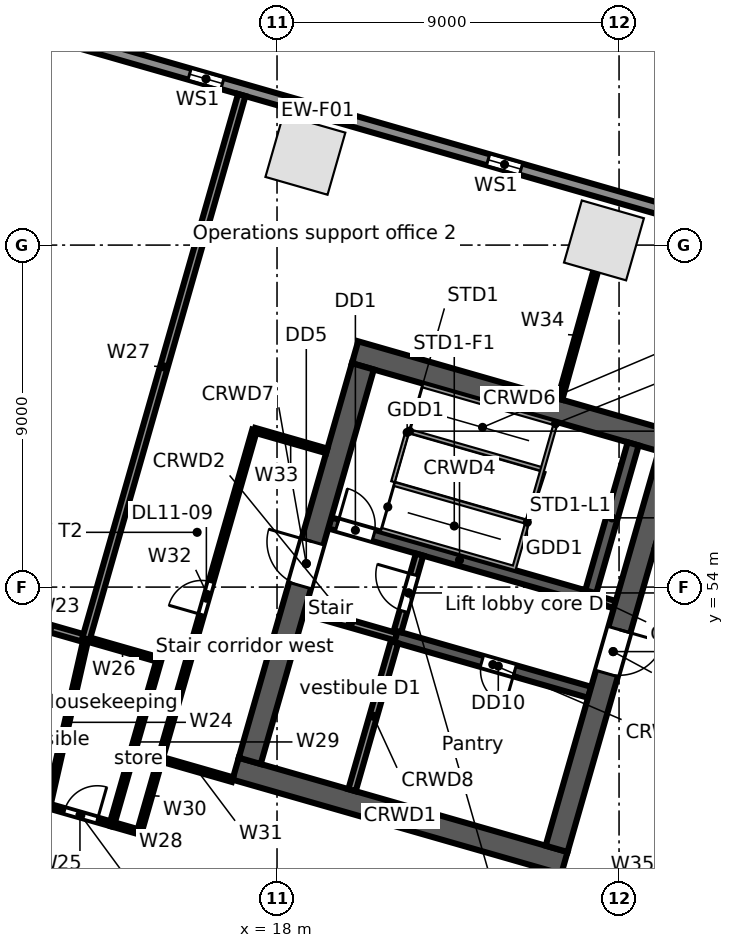
"""IFC4 building model, lengths in metres.
Left out: names, types, materials, properties, quantities, classifications, styles, units other than length and angle.
Written with IfcOpenShell. Run it as: python <this file> out.ifc"""

import sys

from ifc_helpers import new_model, si_unit, direction, frame, frame_2d, origin, origin_2d, place, context, subcontext, project, spatial, rectangle, extrude, element, fill, save


model = new_model("IFC4")
c1 = context("Model", 3, precision=1e-05, world=origin(), true_north=direction((0.0, 1.0)))
c2 = subcontext(c1, "Body", "Model", "MODEL_VIEW")
j1 = project(units=[si_unit("LENGTHUNIT", "METRE"), si_unit("PLANEANGLEUNIT", "RADIAN")], contexts=[c1])
p1 = place(None, origin())
s1 = spatial("IfcSite", under=j1, at=p1, CompositionType="ELEMENT")
p2 = place(p1, origin())
s2 = spatial("IfcBuilding", under=s1, at=p2, CompositionType="ELEMENT")
p3 = place(p2, frame((0.0, 0.0, 56.5)))
s3 = spatial("IfcBuildingStorey", under=s2, at=p3, CompositionType="ELEMENT", Elevation=56.5)
for number, where, z_axis, x_axis in (
    (1, (26.603, 63.124, 0.0), (0.0, 0.0, 1.0), (-0.961, 0.276, 0.0)),
    (2, (18.746, 65.376, 0.0), (0.0, 0.0, 1.0), (-0.961, 0.276, 0.0)),
):
    element("IfcColumn", number, at=place(p3, frame(where, z_axis=z_axis, x_axis=x_axis)), inside=s3, PredefinedType="COLUMN", context=c2, shape_type="SweptSolid", body=[
        extrude(rectangle(XDim=1.7, YDim=1.7, at=origin_2d()), origin(), (0.0, 0.0, 1.0), 5.0),
    ])
p4 = place(p3, frame((3.335, 71.044, 0.0), z_axis=(0.0, 0.0, 1.0), x_axis=(0.961260130989, -0.275642813387, 0.0)))
e3 = element("IfcWall", 3, at=p4, inside=s3, PredefinedType="STANDARD", context=c2, shape_type="SweptSolid", body=[
    extrude(rectangle(XDim=32.741, YDim=0.3, at=frame_2d((16.371, 0.0))), origin(), (0.0, 0.0, 1.0), 4.68),
])
p5 = place(p4, frame((29.207, 0.0, 0.6)))
e4 = element("IfcOpeningElement", 4, at=p5, cuts=e3, PredefinedType="OPENING", context=c2, shape_type="SweptSolid", body=[
    extrude(rectangle(XDim=0.9, YDim=3.2, at=frame_2d((0.45, 1.6))), frame((0.0, 0.16, 0.0), z_axis=(0.0, -1.0, 0.0), x_axis=(1.0, 0.0, 0.0)), (0.0, 0.0, 1.0), 0.32),
])
p6 = place(p4, frame((21.034, 0.0, 0.6)))
e5 = element("IfcOpeningElement", 5, at=p6, cuts=e3, PredefinedType="OPENING", context=c2, shape_type="SweptSolid", body=[
    extrude(rectangle(XDim=0.9, YDim=3.2, at=frame_2d((0.45, 1.6))), frame((0.0, 0.16, 0.0), z_axis=(0.0, -1.0, 0.0), x_axis=(1.0, 0.0, 0.0)), (0.0, 0.0, 1.0), 0.32),
])
p7 = place(p4, frame((12.861, 0.0, 0.6)))
e6 = element("IfcOpeningElement", 6, at=p7, cuts=e3, PredefinedType="OPENING", context=c2, shape_type="SweptSolid", body=[
    extrude(rectangle(XDim=0.9, YDim=3.2, at=frame_2d((0.45, 1.6))), frame((0.0, 0.16, 0.0), z_axis=(0.0, -1.0, 0.0), x_axis=(1.0, 0.0, 0.0)), (0.0, 0.0, 1.0), 0.32),
])
p8 = place(p4, frame((4.688, 0.0, 0.6)))
e7 = element("IfcOpeningElement", 7, at=p8, cuts=e3, PredefinedType="OPENING", context=c2, shape_type="SweptSolid", body=[
    extrude(rectangle(XDim=0.9, YDim=3.2, at=frame_2d((0.45, 1.6))), frame((0.0, 0.16, 0.0), z_axis=(0.0, -1.0, 0.0), x_axis=(1.0, 0.0, 0.0)), (0.0, 0.0, 1.0), 0.32),
])
p9 = place(p3, frame((25.398, 40.717, 0.0), z_axis=(0.0, 0.0, 1.0), x_axis=(-0.961262423262, 0.275634819324, 0.0)))
e8 = element("IfcWall", 8, at=p9, inside=s3, PredefinedType="STANDARD", context=c2, shape_type="SweptSolid", body=[
    extrude(rectangle(XDim=26.359, YDim=0.3, at=frame_2d((13.179, 0.0))), origin(), (0.0, 0.0, 1.0), 4.68),
])
p10 = place(p9, frame((22.664, 0.0, 0.6)))
e9 = element("IfcOpeningElement", 9, at=p10, cuts=e8, PredefinedType="OPENING", context=c2, shape_type="SweptSolid", body=[
    extrude(rectangle(XDim=0.9, YDim=3.2, at=frame_2d((0.45, 1.6))), frame((0.0, 0.16, 0.0), z_axis=(0.0, -1.0, 0.0), x_axis=(1.0, 0.0, 0.0)), (0.0, 0.0, 1.0), 0.32),
])
p11 = place(p9, frame((13.844, 0.0, 0.6)))
e10 = element("IfcOpeningElement", 10, at=p11, cuts=e8, PredefinedType="OPENING", context=c2, shape_type="SweptSolid", body=[
    extrude(rectangle(XDim=0.9, YDim=3.2, at=frame_2d((0.45, 1.6))), frame((0.0, 0.16, 0.0), z_axis=(0.0, -1.0, 0.0), x_axis=(1.0, 0.0, 0.0)), (0.0, 0.0, 1.0), 0.32),
])
p12 = place(p9, frame((5.023, 0.0, 0.6)))
e11 = element("IfcOpeningElement", 11, at=p12, cuts=e8, PredefinedType="OPENING", context=c2, shape_type="SweptSolid", body=[
    extrude(rectangle(XDim=0.9, YDim=3.2, at=frame_2d((0.45, 1.6))), frame((0.0, 0.16, 0.0), z_axis=(0.0, -1.0, 0.0), x_axis=(1.0, 0.0, 0.0)), (0.0, 0.0, 1.0), 0.32),
])
p13 = place(p3, frame((16.911, 49.221, 0.0), z_axis=(0.0, 0.0, 1.0), x_axis=(0.96126248289, -0.275634611374, 0.0)))
e12 = element("IfcWall", 12, at=p13, inside=s3, PredefinedType="SOLIDWALL", context=c2, shape_type="SweptSolid", body=[
    extrude(rectangle(XDim=9.0, YDim=0.6, at=frame_2d((4.5, 0.0))), origin(), (0.0, 0.0, 1.0), 4.68),
])
p14 = place(p3, frame((18.728, 53.382, 0.0), z_axis=(0.0, 0.0, 1.0), x_axis=(0.961247070632, -0.275688355216, 0.0)))
e13 = element("IfcWall", 13, at=p14, inside=s3, PredefinedType="SOLIDWALL", context=c2, shape_type="SweptSolid", body=[
    extrude(rectangle(XDim=2.5, YDim=0.2, at=frame_2d((1.25, 0.0))), origin(), (0.0, 0.0, 1.0), 4.68),
])
p15 = place(p3, frame((21.131, 52.692, 0.0), z_axis=(0.0, 0.0, 1.0), x_axis=(0.961271492568, -0.275603188616, 0.0)))
e14 = element("IfcWall", 14, at=p15, inside=s3, PredefinedType="SOLIDWALL", context=c2, shape_type="SweptSolid", body=[
    extrude(rectangle(XDim=5.3, YDim=0.3, at=frame_2d((2.65, 0.0))), origin(), (0.0, 0.0, 1.0), 4.68),
])
p16 = place(p15, frame((2.35, 0.0, 0.0)))
e15 = element("IfcOpeningElement", 15, at=p16, cuts=e14, PredefinedType="OPENING", context=c2, shape_type="SweptSolid", body=[
    extrude(rectangle(XDim=0.9, YDim=2.1, at=frame_2d((0.45, 1.05))), frame((0.0, 0.16, 0.0), z_axis=(0.0, -1.0, 0.0), x_axis=(1.0, 0.0, 0.0)), (0.0, 0.0, 1.0), 0.32),
])
p17 = place(p3, frame((19.389, 55.689, 0.0), z_axis=(0.0, 0.0, 1.0), x_axis=(0.961261397636, -0.275638396117, 0.0)))
e16 = element("IfcWall", 16, at=p17, inside=s3, PredefinedType="SOLIDWALL", context=c2, shape_type="SweptSolid", body=[
    extrude(rectangle(XDim=7.1, YDim=0.3, at=frame_2d((3.55, 0.0))), origin(), (0.0, 0.0, 1.0), 4.68),
])
p18 = place(p17, frame((0.2, 0.0, 0.0)))
e17 = element("IfcOpeningElement", 17, at=p18, cuts=e16, PredefinedType="OPENING", context=c2, shape_type="SweptSolid", body=[
    extrude(rectangle(XDim=1.0, YDim=2.1, at=frame_2d((0.5, 1.05))), frame((0.0, 0.16, 0.0), z_axis=(0.0, -1.0, 0.0), x_axis=(1.0, 0.0, 0.0)), (0.0, 0.0, 1.0), 0.32),
])
p19 = place(p3, frame((26.214, 53.732, 0.0), z_axis=(0.0, 0.0, 1.0), x_axis=(0.96122076476, -0.27578005982, 0.0)))
e18 = element("IfcWall", 18, at=p19, inside=s3, PredefinedType="SOLIDWALL", context=c2, shape_type="SweptSolid", body=[
    extrude(rectangle(XDim=0.7, YDim=0.2, at=frame_2d((0.35, 0.0))), origin(), (0.0, 0.0, 1.0), 4.68),
])
p20 = place(p3, frame((20.053, 60.18, 0.0), z_axis=(0.0, 0.0, 1.0), x_axis=(0.96126248289, -0.275634611374, 0.0)))
e19 = element("IfcWall", 19, at=p20, inside=s3, PredefinedType="SOLIDWALL", context=c2, shape_type="SweptSolid", body=[
    extrude(rectangle(XDim=9.0, YDim=0.6, at=frame_2d((4.5, 0.0))), origin(), (0.0, 0.0, 1.0), 4.68),
])
p21 = place(p3, frame((17.282, 49.427, 0.0), z_axis=(0.0, 0.0, 1.0), x_axis=(0.275631631629, 0.961263337304, 0.0)))
e20 = element("IfcWall", 20, at=p21, inside=s3, PredefinedType="SOLIDWALL", context=c2, shape_type="SweptSolid", body=[
    extrude(rectangle(XDim=10.8, YDim=0.6, at=frame_2d((5.4, 0.0))), origin(), (0.0, 0.0, 1.0), 4.68),
])
p22 = place(p21, frame((4.8, 0.0, 0.0)))
e21 = element("IfcOpeningElement", 21, at=p22, cuts=e20, PredefinedType="OPENING", context=c2, shape_type="SweptSolid", body=[
    extrude(rectangle(XDim=1.2, YDim=2.1, at=frame_2d((0.6, 1.05))), frame((0.0, 0.31, 0.0), z_axis=(0.0, -1.0, 0.0), x_axis=(1.0, 0.0, 0.0)), (0.0, 0.0, 1.0), 0.62),
])
p23 = place(p3, frame((19.973, 48.655, 0.0), z_axis=(0.0, 0.0, 1.0), x_axis=(0.275668441653, 0.961252781674, 0.0)))
e22 = element("IfcWall", 22, at=p23, inside=s3, PredefinedType="SOLIDWALL", context=c2, shape_type="SweptSolid", body=[
    extrude(rectangle(XDim=4.05, YDim=0.2, at=frame_2d((2.025, 0.0))), origin(), (0.0, 0.0, 1.0), 4.68),
])
p24 = place(p3, frame((21.172, 52.837, 0.0), z_axis=(0.0, 0.0, 1.0), x_axis=(0.275657676022, 0.961255868981, 0.0)))
e23 = element("IfcWall", 23, at=p24, inside=s3, PredefinedType="PARTITIONING", context=c2, shape_type="SweptSolid", body=[
    extrude(rectangle(XDim=2.1, YDim=0.2, at=frame_2d((1.05, 0.0))), origin(), (0.0, 0.0, 1.0), 4.68),
])
p25 = place(p24, frame((0.55, 0.0, 0.0)))
e24 = element("IfcOpeningElement", 24, at=p25, cuts=e23, PredefinedType="OPENING", context=c2, shape_type="SweptSolid", body=[
    extrude(rectangle(XDim=1.0, YDim=2.1, at=frame_2d((0.5, 1.05))), frame((0.0, 0.11, 0.0), z_axis=(0.0, -1.0, 0.0), x_axis=(1.0, 0.0, 0.0)), (0.0, 0.0, 1.0), 0.22),
])
p26 = place(p3, frame((26.256, 53.876, 0.0), z_axis=(0.0, 0.0, 1.0), x_axis=(0.275612739511, 0.961268754209, 0.0)))
e25 = element("IfcWall", 25, at=p26, inside=s3, PredefinedType="SOLIDWALL", context=c2, shape_type="SweptSolid", body=[
    extrude(rectangle(XDim=4.05, YDim=0.3, at=frame_2d((2.025, 0.0))), origin(), (0.0, 0.0, 1.0), 4.68),
])
p27 = place(p3, frame((25.356, 47.112, 0.0), z_axis=(0.0, 0.0, 1.0), x_axis=(0.275631631629, 0.961263337304, 0.0)))
e26 = element("IfcWall", 26, at=p27, inside=s3, PredefinedType="SOLIDWALL", context=c2, shape_type="SweptSolid", body=[
    extrude(rectangle(XDim=10.8, YDim=0.6, at=frame_2d((5.4, 0.0))), origin(), (0.0, 0.0, 1.0), 4.68),
])
p28 = place(p27, frame((4.8, 0.0, 0.0)))
e27 = element("IfcOpeningElement", 27, at=p28, cuts=e26, PredefinedType="OPENING", context=c2, shape_type="SweptSolid", body=[
    extrude(rectangle(XDim=1.2, YDim=2.1, at=frame_2d((0.6, 1.05))), frame((0.0, 0.31, 0.0), z_axis=(0.0, -1.0, 0.0), x_axis=(1.0, 0.0, 0.0)), (0.0, 0.0, 1.0), 0.62),
])
p29 = place(p3, frame((11.051, 53.19, 0.0), z_axis=(0.0, 0.0, 1.0), x_axis=(0.961316434736, -0.275446387355, 0.0)))
e28 = element("IfcWall", 28, at=p29, inside=s3, PredefinedType="PARTITIONING", context=c2, shape_type="SweptSolid", body=[
    extrude(rectangle(XDim=2.0, YDim=0.2, at=frame_2d((1.0, 0.0))), origin(), (0.0, 0.0, 1.0), 4.68),
])
p30 = place(p3, frame((11.973, 48.244, 0.0), z_axis=(0.0, 0.0, 1.0), x_axis=(0.222117362571, 0.975019936845, 0.0)))
e29 = element("IfcWall", 29, at=p30, inside=s3, PredefinedType="PARTITIONING", context=c2, shape_type="SweptSolid", body=[
    extrude(rectangle(XDim=4.508, YDim=0.125, at=frame_2d((2.254, 0.0))), origin(), (0.0, 0.0, 1.0), 4.68),
])
p31 = place(p3, frame((11.973, 48.244, 0.0), z_axis=(0.0, 0.0, 1.0), x_axis=(0.96136592135, -0.275273618907, 0.0)))
e30 = element("IfcWall", 30, at=p31, inside=s3, PredefinedType="PARTITIONING", context=c2, shape_type="SweptSolid", body=[
    extrude(rectangle(XDim=1.751, YDim=0.125, at=frame_2d((0.875, 0.0))), origin(), (0.0, 0.0, 1.0), 4.68),
])
p32 = place(p31, frame((0.45, 0.0, 0.0)))
e31 = element("IfcOpeningElement", 31, at=p32, cuts=e30, PredefinedType="OPENING", context=c2, shape_type="SweptSolid", body=[
    extrude(rectangle(XDim=0.9, YDim=2.1, at=frame_2d((0.45, 1.05))), frame((0.0, 0.073, 0.0), z_axis=(0.0, -1.0, 0.0), x_axis=(1.0, 0.0, 0.0)), (0.0, 0.0, 1.0), 0.145),
])
p33 = place(p3, frame((12.974, 52.639, 0.0), z_axis=(0.0, 0.0, 1.0), x_axis=(0.961270097305, -0.275608055084, 0.0)))
e32 = element("IfcWall", 32, at=p33, inside=s3, PredefinedType="PARTITIONING", context=c2, shape_type="SweptSolid", body=[
    extrude(rectangle(XDim=1.999, YDim=0.125, at=frame_2d((1.0, 0.0))), origin(), (0.0, 0.0, 1.0), 4.68),
])
p34 = place(p3, frame((12.974, 52.639, 0.0), z_axis=(0.0, 0.0, 1.0), x_axis=(0.275299463768, 0.961358520662, 0.0)))
e33 = element("IfcWall", 33, at=p34, inside=s3, PredefinedType="PARTITIONING", context=c2, shape_type="SweptSolid", body=[
    extrude(rectangle(XDim=14.885, YDim=0.2, at=frame_2d((7.443, 0.0))), origin(), (0.0, 0.0, 1.0), 3.742),
])
p35 = place(p3, frame((13.656, 47.762, 0.0), z_axis=(0.0, 0.0, 1.0), x_axis=(0.961154610169, -0.276010534854, 0.0)))
e34 = element("IfcWall", 34, at=p35, inside=s3, PredefinedType="PARTITIONING", context=c2, shape_type="SweptSolid", body=[
    extrude(rectangle(XDim=0.75, YDim=0.125, at=frame_2d((0.375, 0.0))), origin(), (0.0, 0.0, 1.0), 4.68),
])
p36 = place(p3, frame((13.656, 47.762, 0.0), z_axis=(0.0, 0.0, 1.0), x_axis=(0.275545040649, 0.96128816209, 0.0)))
e35 = element("IfcWall", 35, at=p36, inside=s3, PredefinedType="PARTITIONING", context=c2, shape_type="SweptSolid", body=[
    extrude(rectangle(XDim=4.5, YDim=0.125, at=frame_2d((2.25, 0.0))), origin(), (0.0, 0.0, 1.0), 4.68),
])
p37 = place(p3, frame((14.377, 47.555, 0.0), z_axis=(0.0, 0.0, 1.0), x_axis=(0.275446387355, 0.961316434736, 0.0)))
e36 = element("IfcWall", 36, at=p37, inside=s3, PredefinedType="PARTITIONING", context=c2, shape_type="SweptSolid", body=[
    extrude(rectangle(XDim=2.0, YDim=0.125, at=frame_2d((1.0, 0.0))), origin(), (0.0, 0.0, 1.0), 4.68),
])
p38 = place(p3, frame((14.928, 49.478, 0.0), z_axis=(0.0, 0.0, 1.0), x_axis=(0.961243778232, -0.27569983462, 0.0)))
e37 = element("IfcWall", 37, at=p38, inside=s3, PredefinedType="PARTITIONING", context=c2, shape_type="SweptSolid", body=[
    extrude(rectangle(XDim=1.977, YDim=0.125, at=frame_2d((0.988, 0.0))), origin(), (0.0, 0.0, 1.0), 4.68),
])
p39 = place(p3, frame((14.928, 49.478, 0.0), z_axis=(0.0, 0.0, 1.0), x_axis=(0.275674053528, 0.961251172281, 0.0)))
e38 = element("IfcWall", 38, at=p39, inside=s3, PredefinedType="PARTITIONING", context=c2, shape_type="SweptSolid", body=[
    extrude(rectangle(XDim=9.0, YDim=0.125, at=frame_2d((4.5, 0.0))), origin(), (0.0, 0.0, 1.0), 3.742),
])
p40 = place(p39, frame((3.95, 0.0, 0.0)))
e39 = element("IfcOpeningElement", 39, at=p40, cuts=e38, PredefinedType="OPENING", context=c2, shape_type="SweptSolid", body=[
    extrude(rectangle(XDim=0.9, YDim=2.1, at=frame_2d((0.45, 1.05))), frame((0.0, 0.073, 0.0), z_axis=(0.0, -1.0, 0.0), x_axis=(1.0, 0.0, 0.0)), (0.0, 0.0, 1.0), 0.145),
])
p41 = place(p3, frame((17.409, 58.129, 0.0), z_axis=(0.0, 0.0, 1.0), x_axis=(0.961253165474, -0.275667103345, 0.0)))
e40 = element("IfcWall", 40, at=p41, inside=s3, PredefinedType="PARTITIONING", context=c2, shape_type="SweptSolid", body=[
    extrude(rectangle(XDim=1.977, YDim=0.125, at=frame_2d((0.988, 0.0))), origin(), (0.0, 0.0, 1.0), 4.68),
])
p42 = place(p3, frame((25.445, 58.946, 0.0), z_axis=(0.0, 0.0, 1.0), x_axis=(0.268850353538, 0.963181959654, 0.0)))
e41 = element("IfcWall", 41, at=p42, inside=s3, PredefinedType="PARTITIONING", context=c2, shape_type="SweptSolid", body=[
    extrude(rectangle(XDim=3.485, YDim=0.125, at=frame_2d((1.743, 0.0))), origin(), (0.0, 0.0, 1.0), 4.154),
])
p43 = place(p3, frame((26.456, 42.338, 0.0), z_axis=(0.0, 0.0, 1.0), x_axis=(0.52980027265, 0.848122438743, 0.0)))
e42 = element("IfcWall", 42, at=p43, inside=s3, PredefinedType="PARTITIONING", context=c2, shape_type="SweptSolid", body=[
    extrude(rectangle(XDim=6.076, YDim=0.25, at=frame_2d((3.038, 0.0))), origin(), (0.0, 0.0, 1.0), 4.68),
])
p44 = place(p43, frame((2.2, 0.0, 0.0)))
e43 = element("IfcOpeningElement", 43, at=p44, cuts=e42, PredefinedType="OPENING", context=c2, shape_type="SweptSolid", body=[
    extrude(rectangle(XDim=1.8, YDim=2.1, at=frame_2d((0.9, 1.05))), frame((0.0, 0.135, 0.0), z_axis=(0.0, -1.0, 0.0), x_axis=(1.0, 0.0, 0.0)), (0.0, 0.0, 1.0), 0.27),
])
p45 = place(p6, origin())
e44 = element("IfcWindow", 44, at=p45, inside=s3, PartitioningType="SINGLE_PANEL", PredefinedType="WINDOW", context=c2, shape_type="SweptSolid", body=[
    extrude(rectangle(XDim=0.9, YDim=3.2, at=frame_2d((0.45, 1.6))), frame((0.0, 0.03, 0.0), z_axis=(0.0, -1.0, 0.0), x_axis=(1.0, 0.0, 0.0)), (0.0, 0.0, 1.0), 0.06),
])
fill(e5, e44)
p46 = place(p7, origin())
e45 = element("IfcWindow", 45, at=p46, inside=s3, PartitioningType="SINGLE_PANEL", PredefinedType="WINDOW", context=c2, shape_type="SweptSolid", body=[
    extrude(rectangle(XDim=0.9, YDim=3.2, at=frame_2d((0.45, 1.6))), frame((0.0, 0.03, 0.0), z_axis=(0.0, -1.0, 0.0), x_axis=(1.0, 0.0, 0.0)), (0.0, 0.0, 1.0), 0.06),
])
fill(e6, e45)
p47 = place(p18, origin())
e46 = element("IfcDoor", 46, at=p47, inside=s3, OperationType="SINGLE_SWING_LEFT", PredefinedType="DOOR", context=c2, shape_type="SweptSolid", body=[
    extrude(rectangle(XDim=1.0, YDim=2.1, at=frame_2d((0.5, 1.05))), frame((0.0, 0.025, 0.0), z_axis=(0.0, -1.0, 0.0), x_axis=(1.0, 0.0, 0.0)), (0.0, 0.0, 1.0), 0.05),
])
fill(e17, e46)
p48 = place(p25, origin())
e47 = element("IfcDoor", 47, at=p48, inside=s3, OperationType="SINGLE_SWING_RIGHT", PredefinedType="DOOR", context=c2, shape_type="SweptSolid", body=[
    extrude(rectangle(XDim=1.0, YDim=2.1, at=frame_2d((0.5, 1.05))), frame((0.0, 0.025, 0.0), z_axis=(0.0, -1.0, 0.0), x_axis=(1.0, 0.0, 0.0)), (0.0, 0.0, 1.0), 0.05),
])
fill(e24, e47)
p49 = place(p22, origin())
e48 = element("IfcDoor", 48, at=p49, inside=s3, OperationType="SINGLE_SWING_RIGHT", PredefinedType="DOOR", context=c2, shape_type="SweptSolid", body=[
    extrude(rectangle(XDim=1.2, YDim=2.1, at=frame_2d((0.6, 1.05))), frame((0.0, 0.025, 0.0), z_axis=(0.0, -1.0, 0.0), x_axis=(1.0, 0.0, 0.0)), (0.0, 0.0, 1.0), 0.05),
])
fill(e21, e48)
p50 = place(p28, frame((1.2, 0.0, 0.0), z_axis=(0.0, 0.0, 1.0), x_axis=(-1.0, 0.0, 0.0)))
e49 = element("IfcDoor", 49, at=p50, inside=s3, OperationType="SINGLE_SWING_LEFT", PredefinedType="DOOR", context=c2, shape_type="SweptSolid", body=[
    extrude(rectangle(XDim=1.2, YDim=2.1, at=frame_2d((0.6, 1.05))), frame((0.0, 0.025, 0.0), z_axis=(0.0, -1.0, 0.0), x_axis=(1.0, 0.0, 0.0)), (0.0, 0.0, 1.0), 0.05),
])
fill(e27, e49)
p51 = place(p16, frame((0.9, 0.0, 0.0), z_axis=(0.0, 0.0, 1.0), x_axis=(-1.0, 0.0, 0.0)))
e50 = element("IfcDoor", 50, at=p51, inside=s3, OperationType="SINGLE_SWING_LEFT", PredefinedType="DOOR", context=c2, shape_type="SweptSolid", body=[
    extrude(rectangle(XDim=0.9, YDim=2.1, at=frame_2d((0.45, 1.05))), frame((0.0, 0.025, 0.0), z_axis=(0.0, -1.0, 0.0), x_axis=(1.0, 0.0, 0.0)), (0.0, 0.0, 1.0), 0.05),
])
fill(e15, e50)
p52 = place(p32, origin())
e51 = element("IfcDoor", 51, at=p52, inside=s3, OperationType="SINGLE_SWING_RIGHT", PredefinedType="DOOR", context=c2, shape_type="SweptSolid", body=[
    extrude(rectangle(XDim=0.9, YDim=2.1, at=frame_2d((0.45, 1.05))), frame((0.0, 0.025, 0.0), z_axis=(0.0, -1.0, 0.0), x_axis=(1.0, 0.0, 0.0)), (0.0, 0.0, 1.0), 0.05),
])
fill(e31, e51)
p53 = place(p40, origin())
e52 = element("IfcDoor", 52, at=p53, inside=s3, OperationType="SINGLE_SWING_LEFT", PredefinedType="DOOR", context=c2, shape_type="SweptSolid", body=[
    extrude(rectangle(XDim=0.9, YDim=2.1, at=frame_2d((0.45, 1.05))), frame((0.0, 0.025, 0.0), z_axis=(0.0, -1.0, 0.0), x_axis=(1.0, 0.0, 0.0)), (0.0, 0.0, 1.0), 0.05),
])
fill(e39, e52)
save(model, sys.argv[1])
